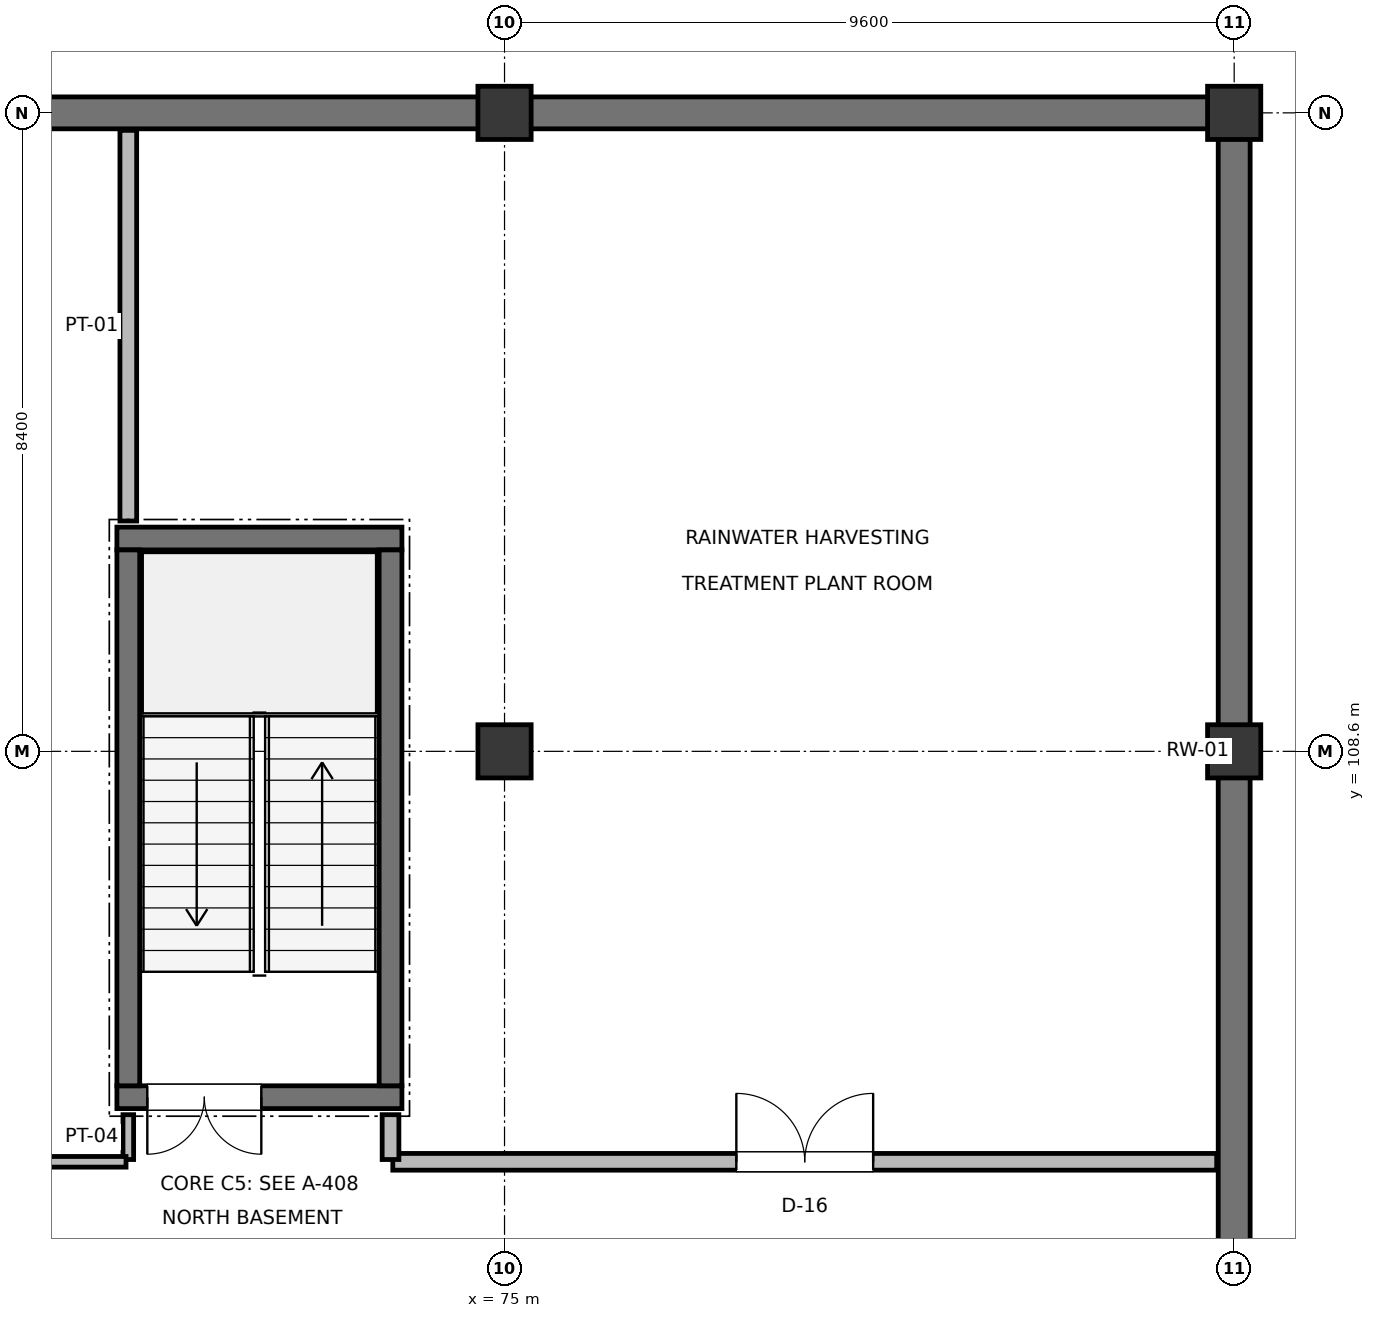
"""IFC4 building model, lengths in metres.
Left out: names, types, materials, properties, quantities, classifications, styles, units other than length and angle.
Written with IfcOpenShell. Run it as: python <this file> out.ifc"""

import sys

from ifc_helpers import new_model, si_unit, direction, frame, frame_2d, origin, origin_2d, place, context, subcontext, project, spatial, rectangle, extrude, element, fill, save


model = new_model("IFC4")
c1 = context("Model", 3, precision=1e-05, world=origin(), true_north=direction((0.0, 1.0)))
c2 = subcontext(c1, "Body", "Model", "MODEL_VIEW")
j1 = project(units=[si_unit("LENGTHUNIT", "METRE"), si_unit("PLANEANGLEUNIT", "RADIAN")], contexts=[c1])
p1 = place(None, origin())
s1 = spatial("IfcSite", under=j1, at=p1, CompositionType="ELEMENT")
p2 = place(p1, origin())
s2 = spatial("IfcBuilding", under=s1, at=p2, CompositionType="ELEMENT")
p3 = place(p2, frame((0.0, 0.0, -4.5)))
s3 = spatial("IfcBuildingStorey", under=s2, at=p3, CompositionType="ELEMENT", Elevation=-4.5)
for number, where, z_axis, x_axis in (
    (1, (75.0, 108.6, 0.0), (0.0, 0.0, 1.0), (1.0, 0.0, 0.0)),
    (2, (75.0, 117.0, 0.0), (0.0, 0.0, 1.0), (1.0, 0.0, 0.0)),
    (3, (84.6, 108.6, 0.0), (0.0, 0.0, 1.0), (1.0, 0.0, 0.0)),
    (4, (84.6, 117.0, 0.0), (0.0, 0.0, 1.0), (1.0, 0.0, 0.0)),
):
    element("IfcColumn", number, at=place(p3, frame(where, z_axis=z_axis, x_axis=x_axis)), inside=s3, PredefinedType="COLUMN", context=c2, shape_type="SweptSolid", body=[
        extrude(rectangle(XDim=0.7, YDim=0.7, at=origin_2d()), origin(), (0.0, 0.0, 1.0), 4.5),
    ])
p4 = place(p3, frame((84.6, 100.195, 0.0), z_axis=(0.0, 0.0, 1.0), x_axis=(0.0, 1.0, 0.0)))
e5 = element("IfcWall", 5, at=p4, inside=s3, PredefinedType="STANDARD", context=c2, shape_type="SweptSolid", body=[
    extrude(rectangle(XDim=16.81, YDim=0.42, at=frame_2d((8.405, 0.0))), origin(), (0.0, 0.0, 1.0), 3.45),
])
p5 = place(p3, frame((2.995, 117.0, 0.0), z_axis=(0.0, 0.0, 1.0), x_axis=(1.0, 0.0, 0.0)))
e6 = element("IfcWall", 6, at=p5, inside=s3, PredefinedType="STANDARD", context=c2, shape_type="SweptSolid", body=[
    extrude(rectangle(XDim=81.61, YDim=0.42, at=frame_2d((40.805, 0.0))), origin(), (0.0, 0.0, 1.0), 3.45),
])
p6 = place(p3, frame((69.9, 104.05, 0.0), z_axis=(0.0, 0.0, 1.0), x_axis=(1.0, 0.0, 0.0)))
e7 = element("IfcWall", 7, at=p6, inside=s3, PredefinedType="SHEAR", context=c2, shape_type="SweptSolid", body=[
    extrude(rectangle(XDim=3.75, YDim=0.3, at=frame_2d((1.875, 0.0))), origin(), (0.0, 0.0, 1.0), 4.28),
])
p7 = place(p6, frame((0.4, 0.0, 0.0)))
e8 = element("IfcOpeningElement", 8, at=p7, cuts=e7, PredefinedType="OPENING", context=c2, shape_type="SweptSolid", body=[
    extrude(rectangle(XDim=1.5, YDim=2.2, at=frame_2d((0.75, 1.1))), frame((0.0, 0.16, 0.0), z_axis=(0.0, -1.0, 0.0), x_axis=(1.0, 0.0, 0.0)), (0.0, 0.0, 1.0), 0.32),
])
p8 = place(p3, frame((69.9, 111.4, 0.0), z_axis=(0.0, 0.0, 1.0), x_axis=(1.0, 0.0, 0.0)))
e9 = element("IfcWall", 9, at=p8, inside=s3, PredefinedType="SHEAR", context=c2, shape_type="SweptSolid", body=[
    extrude(rectangle(XDim=3.75, YDim=0.3, at=frame_2d((1.875, 0.0))), origin(), (0.0, 0.0, 1.0), 4.28),
])
for number, where, z_axis, x_axis in (
    (10, (70.05, 104.2, 0.0), (0.0, 0.0, 1.0), (0.0, 1.0, 0.0)),
    (11, (73.5, 104.2, 0.0), (0.0, 0.0, 1.0), (0.0, 1.0, 0.0)),
):
    element("IfcWall", number, at=place(p3, frame(where, z_axis=z_axis, x_axis=x_axis)), inside=s3, PredefinedType="SHEAR", context=c2, shape_type="SweptSolid", body=[
        extrude(rectangle(XDim=7.05, YDim=0.3, at=frame_2d((3.525, 0.0))), origin(), (0.0, 0.0, 1.0), 4.28),
    ])
p9 = place(p3, frame((70.05, 111.63, 0.0), z_axis=(0.0, 0.0, 1.0), x_axis=(0.0, 1.0, 0.0)))
e12 = element("IfcWall", 12, at=p9, inside=s3, PredefinedType="PARTITIONING", context=c2, shape_type="SweptSolid", body=[
    extrude(rectangle(XDim=5.14, YDim=0.22, at=frame_2d((2.57, 0.0))), origin(), (0.0, 0.0, 1.0), 3.475),
])
p10 = place(p3, frame((70.05, 103.23, 0.0), z_axis=(0.0, 0.0, 1.0), x_axis=(0.0, 1.0, 0.0)))
e13 = element("IfcWall", 13, at=p10, inside=s3, PredefinedType="PARTITIONING", context=c2, shape_type="SweptSolid", body=[
    extrude(rectangle(XDim=0.59, YDim=0.14, at=frame_2d((0.295, 0.0))), origin(), (0.0, 0.0, 1.0), 4.18),
])
p11 = place(p3, frame((46.23, 103.2, 0.0), z_axis=(0.0, 0.0, 1.0), x_axis=(1.0, 0.0, 0.0)))
e14 = element("IfcWall", 14, at=p11, inside=s3, PredefinedType="PARTITIONING", context=c2, shape_type="SweptSolid", body=[
    extrude(rectangle(XDim=23.79, YDim=0.14, at=frame_2d((11.895, 0.0))), origin(), (0.0, 0.0, 1.0), 3.525),
])
p12 = place(p11, frame((11.355, 0.0, 0.0)))
e15 = element("IfcOpeningElement", 15, at=p12, cuts=e14, PredefinedType="OPENING", context=c2, shape_type="SweptSolid", body=[
    extrude(rectangle(XDim=1.08, YDim=2.15, at=frame_2d((0.54, 1.075))), frame((0.0, 0.08, 0.0), z_axis=(0.0, -1.0, 0.0), x_axis=(1.0, 0.0, 0.0)), (0.0, 0.0, 1.0), 0.16),
])
p13 = place(p3, frame((73.53, 103.2, 0.0), z_axis=(0.0, 0.0, 1.0), x_axis=(1.0, 0.0, 0.0)))
e16 = element("IfcWall", 16, at=p13, inside=s3, PredefinedType="PARTITIONING", context=c2, shape_type="SweptSolid", body=[
    extrude(rectangle(XDim=10.84, YDim=0.22, at=frame_2d((5.42, 0.0))), origin(), (0.0, 0.0, 1.0), 3.525),
])
p14 = place(p13, frame((4.52, 0.0, 0.0)))
e17 = element("IfcOpeningElement", 17, at=p14, cuts=e16, PredefinedType="OPENING", context=c2, shape_type="SweptSolid", body=[
    extrude(rectangle(XDim=1.8, YDim=2.4, at=frame_2d((0.9, 1.2))), frame((0.0, 0.12, 0.0), z_axis=(0.0, -1.0, 0.0), x_axis=(1.0, 0.0, 0.0)), (0.0, 0.0, 1.0), 0.24),
])
p15 = place(p3, frame((73.5, 103.23, 0.0), z_axis=(0.0, 0.0, 1.0), x_axis=(0.0, 1.0, 0.0)))
e18 = element("IfcWall", 18, at=p15, inside=s3, PredefinedType="PARTITIONING", context=c2, shape_type="SweptSolid", body=[
    extrude(rectangle(XDim=0.59, YDim=0.22, at=frame_2d((0.295, 0.0))), origin(), (0.0, 0.0, 1.0), 4.18),
])
p16 = place(p7, frame((1.5, 0.0, 0.0), z_axis=(0.0, 0.0, 1.0), x_axis=(-1.0, 0.0, 0.0)))
e19 = element("IfcDoor", 19, at=p16, inside=s3, OperationType="DOUBLE_DOOR_SINGLE_SWING", PredefinedType="DOOR", context=c2, shape_type="SweptSolid", body=[
    extrude(rectangle(XDim=1.5, YDim=2.2, at=frame_2d((0.75, 1.1))), frame((0.0, 0.025, 0.0), z_axis=(0.0, -1.0, 0.0), x_axis=(1.0, 0.0, 0.0)), (0.0, 0.0, 1.0), 0.05),
])
fill(e8, e19)
p17 = place(p14, origin())
e20 = element("IfcDoor", 20, at=p17, inside=s3, OperationType="DOUBLE_DOOR_SINGLE_SWING", PredefinedType="DOOR", context=c2, shape_type="SweptSolid", body=[
    extrude(rectangle(XDim=1.8, YDim=2.4, at=frame_2d((0.9, 1.2))), frame((0.0, 0.025, 0.0), z_axis=(0.0, -1.0, 0.0), x_axis=(1.0, 0.0, 0.0)), (0.0, 0.0, 1.0), 0.05),
])
fill(e17, e20)
save(model, sys.argv[1])
